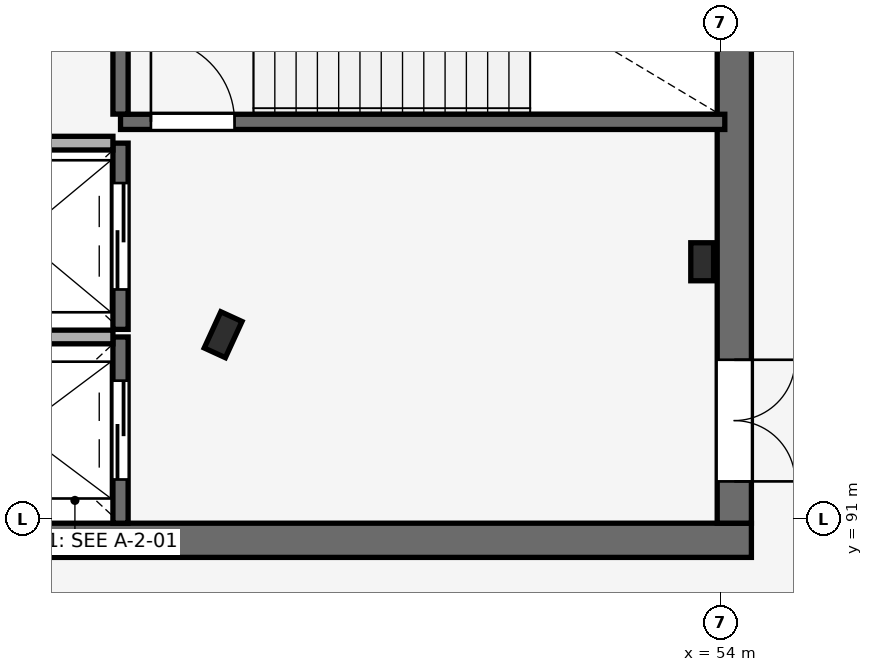
"""IFC4 building model, lengths in metres.
Left out: names, types, materials, properties, quantities, classifications, styles, units other than length and angle.
Written with IfcOpenShell. Run it as: python <this file> out.ifc"""

import sys

from ifc_helpers import new_model, si_unit, direction, frame, frame_2d, origin, origin_2d, place, context, subcontext, project, spatial, rectangle, i_section, extrude, element, fill, save


model = new_model("IFC4")
c1 = context("Model", 3, precision=1e-05, world=origin(), true_north=direction((0.0, 1.0)))
c2 = subcontext(c1, "Body", "Model", "MODEL_VIEW")
j1 = project(units=[si_unit("LENGTHUNIT", "METRE"), si_unit("PLANEANGLEUNIT", "RADIAN")], contexts=[c1])
p1 = place(None, origin())
s1 = spatial("IfcSite", under=j1, at=p1, CompositionType="ELEMENT")
p2 = place(p1, origin())
s2 = spatial("IfcBuilding", under=s1, at=p2, CompositionType="ELEMENT")
p3 = place(p2, frame((0.0, 0.0, 5.4)))
s3 = spatial("IfcBuildingStorey", under=s2, at=p3, CompositionType="ELEMENT", Elevation=5.4)
p4 = place(p3, frame((47.45, 93.43, 0.0), z_axis=(0.0, 0.0, 1.0), x_axis=(-0.909018020308, 0.416756810089, 0.0)))
e1 = element("IfcColumn", 1, at=p4, inside=s3, PredefinedType="COLUMN", context=c2, shape_type="SweptSolid", body=[
    extrude(i_section(OverallWidth=0.306, OverallDepth=0.524, WebThickness=0.021, FlangeThickness=0.04, FilletRadius=0.027, at=origin_2d()), origin(), (0.0, 0.0, 1.0), 4.8),
])
p5 = place(p3, frame((43.0, 90.725, 0.0), z_axis=(0.0, 0.0, 1.0), x_axis=(1.0, 0.0, 0.0)))
e2 = element("IfcWall", 2, at=p5, inside=s3, PredefinedType="SHEAR", context=c2, shape_type="SweptSolid", body=[
    extrude(rectangle(XDim=11.4, YDim=0.45, at=frame_2d((5.7, 0.0))), origin(), (0.0, 0.0, 1.0), 4.8),
])
p6 = place(p3, frame((54.175, 90.95, 0.0), z_axis=(0.0, 0.0, 1.0), x_axis=(0.0, 1.0, 0.0)))
e3 = element("IfcWall", 3, at=p6, inside=s3, PredefinedType="SHEAR", context=c2, shape_type="SweptSolid", body=[
    extrude(rectangle(XDim=9.1, YDim=0.45, at=frame_2d((4.55, 0.0))), origin(), (0.0, 0.0, 1.0), 4.8),
])
p7 = place(p6, frame((0.55, 0.0, 0.0)))
e4 = element("IfcOpeningElement", 4, at=p7, cuts=e3, PredefinedType="OPENING", context=c2, shape_type="SweptSolid", body=[
    extrude(rectangle(XDim=1.6, YDim=2.2, at=frame_2d((0.8, 1.1))), frame((0.0, 0.235, 0.0), z_axis=(0.0, -1.0, 0.0), x_axis=(1.0, 0.0, 0.0)), (0.0, 0.0, 1.0), 0.47),
])
p8 = place(p3, frame((53.752, 94.389, 0.0), z_axis=(0.0, 0.0, 1.0), x_axis=(1.0, 0.0, 0.0)))
e5 = element("IfcColumn", 5, at=p8, inside=s3, PredefinedType="COLUMN", context=c2, shape_type="SweptSolid", body=[
    extrude(i_section(OverallWidth=0.3, OverallDepth=0.5, WebThickness=0.014, FlangeThickness=0.028, FilletRadius=0.027, at=origin_2d()), origin(), (0.0, 0.0, 1.0), 4.8),
])
p9 = place(p3, frame((46.1, 90.95, 0.0), z_axis=(0.0, 0.0, 1.0), x_axis=(0.0, 1.0, 0.0)))
e6 = element("IfcWall", 6, at=p9, inside=s3, PredefinedType="SHEAR", context=c2, shape_type="SweptSolid", body=[
    extrude(rectangle(XDim=2.45, YDim=0.2, at=frame_2d((1.225, 0.0))), origin(), (0.0, 0.0, 1.0), 4.52),
])
p10 = place(p9, frame((0.575, 0.0, 0.0)))
e7 = element("IfcOpeningElement", 7, at=p10, cuts=e6, PredefinedType="OPENING", context=c2, shape_type="SweptSolid", body=[
    extrude(rectangle(XDim=1.3, YDim=2.2, at=frame_2d((0.65, 1.1))), frame((0.0, 0.11, 0.0), z_axis=(0.0, -1.0, 0.0), x_axis=(1.0, 0.0, 0.0)), (0.0, 0.0, 1.0), 0.22),
])
p11 = place(p3, frame((43.55, 93.4, 0.0), z_axis=(0.0, 0.0, 1.0), x_axis=(1.0, 0.0, 0.0)))
e8 = element("IfcWall", 8, at=p11, inside=s3, PredefinedType="PARTITIONING", context=c2, shape_type="SweptSolid", body=[
    extrude(rectangle(XDim=2.45, YDim=0.18, at=frame_2d((1.225, 0.0))), origin(), (0.0, 0.0, 1.0), 4.8),
])
p12 = place(p3, frame((46.1, 93.5, 0.0), z_axis=(0.0, 0.0, 1.0), x_axis=(0.0, 1.0, 0.0)))
e9 = element("IfcWall", 9, at=p12, inside=s3, PredefinedType="SHEAR", context=c2, shape_type="SweptSolid", body=[
    extrude(rectangle(XDim=2.45, YDim=0.2, at=frame_2d((1.225, 0.0))), origin(), (0.0, 0.0, 1.0), 4.52),
])
p13 = place(p12, frame((0.525, 0.0, 0.0)))
e10 = element("IfcOpeningElement", 10, at=p13, cuts=e9, PredefinedType="OPENING", context=c2, shape_type="SweptSolid", body=[
    extrude(rectangle(XDim=1.4, YDim=2.2, at=frame_2d((0.7, 1.1))), frame((0.0, 0.11, 0.0), z_axis=(0.0, -1.0, 0.0), x_axis=(1.0, 0.0, 0.0)), (0.0, 0.0, 1.0), 0.22),
])
p14 = place(p3, frame((43.55, 95.95, 0.0), z_axis=(0.0, 0.0, 1.0), x_axis=(1.0, 0.0, 0.0)))
e11 = element("IfcWall", 11, at=p14, inside=s3, PredefinedType="PARTITIONING", context=c2, shape_type="SweptSolid", body=[
    extrude(rectangle(XDim=2.45, YDim=0.18, at=frame_2d((1.225, 0.0))), origin(), (0.0, 0.0, 1.0), 4.8),
])
p15 = place(p3, frame((46.1, 96.23, 0.0), z_axis=(0.0, 0.0, 1.0), x_axis=(1.0, 0.0, 0.0)))
e12 = element("IfcWall", 12, at=p15, inside=s3, PredefinedType="SHEAR", context=c2, shape_type="SweptSolid", body=[
    extrude(rectangle(XDim=7.95, YDim=0.2, at=frame_2d((3.975, 0.0))), origin(), (0.0, 0.0, 1.0), 4.8),
])
p16 = place(p15, frame((0.4, 0.0, 0.0)))
e13 = element("IfcOpeningElement", 13, at=p16, cuts=e12, PredefinedType="OPENING", context=c2, shape_type="SweptSolid", body=[
    extrude(rectangle(XDim=1.1, YDim=2.15, at=frame_2d((0.55, 1.075))), frame((0.0, 0.11, 0.0), z_axis=(0.0, -1.0, 0.0), x_axis=(1.0, 0.0, 0.0)), (0.0, 0.0, 1.0), 0.22),
])
p17 = place(p3, frame((46.1, 96.332, 0.0), z_axis=(0.0, 0.0, 1.0), x_axis=(0.0, 1.0, 0.0)))
e14 = element("IfcWall", 14, at=p17, inside=s3, PredefinedType="SHEAR", context=c2, shape_type="SweptSolid", body=[
    extrude(rectangle(XDim=3.686, YDim=0.2, at=frame_2d((1.843, 0.0))), origin(), (0.0, 0.0, 1.0), 4.8),
])
p18 = place(p10, origin())
e15 = element("IfcDoor", 15, at=p18, inside=s3, OperationType="DOUBLE_DOOR_SLIDING", PredefinedType="DOOR", context=c2, shape_type="SweptSolid", body=[
    extrude(rectangle(XDim=1.3, YDim=2.2, at=frame_2d((0.65, 1.1))), frame((0.0, 0.025, 0.0), z_axis=(0.0, -1.0, 0.0), x_axis=(1.0, 0.0, 0.0)), (0.0, 0.0, 1.0), 0.05),
])
fill(e7, e15)
p19 = place(p13, origin())
e16 = element("IfcDoor", 16, at=p19, inside=s3, OperationType="DOUBLE_DOOR_SLIDING", PredefinedType="DOOR", context=c2, shape_type="SweptSolid", body=[
    extrude(rectangle(XDim=1.4, YDim=2.2, at=frame_2d((0.7, 1.1))), frame((0.0, 0.025, 0.0), z_axis=(0.0, -1.0, 0.0), x_axis=(1.0, 0.0, 0.0)), (0.0, 0.0, 1.0), 0.05),
])
fill(e10, e16)
p20 = place(p16, frame((1.1, 0.0, 0.0), z_axis=(0.0, 0.0, 1.0), x_axis=(-1.0, 0.0, 0.0)))
e17 = element("IfcDoor", 17, at=p20, inside=s3, OperationType="SINGLE_SWING_RIGHT", PredefinedType="DOOR", context=c2, shape_type="SweptSolid", body=[
    extrude(rectangle(XDim=1.1, YDim=2.15, at=frame_2d((0.55, 1.075))), frame((0.0, 0.025, 0.0), z_axis=(0.0, -1.0, 0.0), x_axis=(1.0, 0.0, 0.0)), (0.0, 0.0, 1.0), 0.05),
])
fill(e13, e17)
p21 = place(p7, frame((1.6, 0.0, 0.0), z_axis=(0.0, 0.0, 1.0), x_axis=(-1.0, 0.0, 0.0)))
e18 = element("IfcDoor", 18, at=p21, inside=s3, OperationType="DOUBLE_DOOR_SINGLE_SWING", PredefinedType="DOOR", context=c2, shape_type="SweptSolid", body=[
    extrude(rectangle(XDim=1.6, YDim=2.2, at=frame_2d((0.8, 1.1))), frame((0.0, 0.025, 0.0), z_axis=(0.0, -1.0, 0.0), x_axis=(1.0, 0.0, 0.0)), (0.0, 0.0, 1.0), 0.05),
])
fill(e4, e18)
save(model, sys.argv[1])
